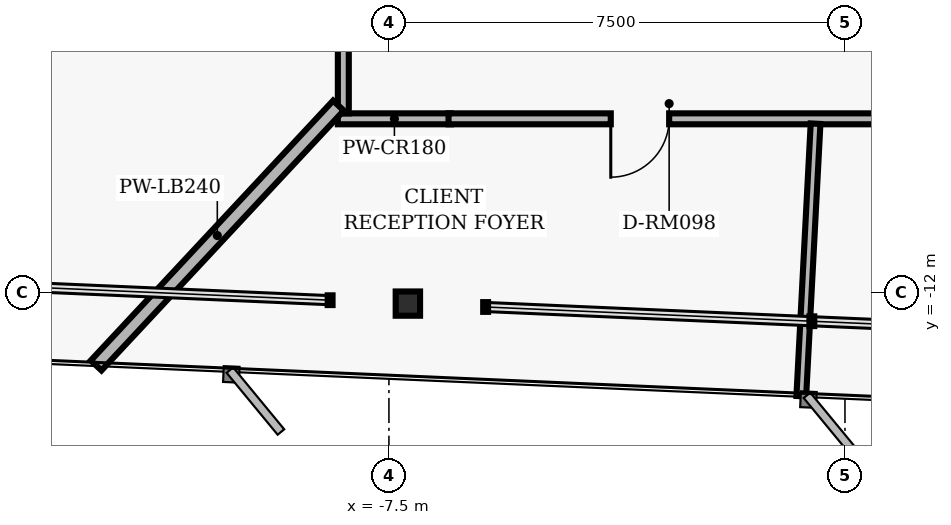
"""IFC4 building model, lengths in metres.
Left out: names, types, materials, properties, quantities, classifications, styles, units other than length and angle.
Written with IfcOpenShell. Run it as: python <this file> out.ifc"""

import sys

from ifc_helpers import new_model, si_unit, direction, frame, frame_2d, origin, origin_2d, place, context, subcontext, project, spatial, rectangle, i_section, extrude, element, fill, save


model = new_model("IFC4")
c1 = context("Model", 3, precision=1e-05, world=origin(), true_north=direction((0.0, 1.0)))
c2 = subcontext(c1, "Body", "Model", "MODEL_VIEW")
j1 = project(units=[si_unit("LENGTHUNIT", "METRE"), si_unit("PLANEANGLEUNIT", "RADIAN")], contexts=[c1])
p1 = place(None, origin())
s1 = spatial("IfcSite", under=j1, at=p1, CompositionType="ELEMENT")
p2 = place(p1, origin())
s2 = spatial("IfcBuilding", under=s1, at=p2, CompositionType="ELEMENT")
p3 = place(p2, frame((0.0, 0.0, 141.12)))
s3 = spatial("IfcBuildingStorey", under=s2, at=p3, CompositionType="ELEMENT", Elevation=141.12)
p4 = place(p3, frame((-7.188, -12.189, 0.0), z_axis=(0.0, 0.0, 1.0), x_axis=(1.0, 0.0, 0.0)))
e1 = element("IfcColumn", 1, at=p4, inside=s3, PredefinedType="COLUMN", context=c2, shape_type="SweptSolid", body=[
    extrude(i_section(OverallWidth=0.401, OverallDepth=0.399, WebThickness=0.025, FlangeThickness=0.04, FilletRadius=0.018, at=origin_2d()), origin(), (0.0, 0.0, 1.0), 3.04),
])
p5 = place(p3, frame((-6.48, -9.15, 0.0), z_axis=(0.0, 0.0, 1.0), x_axis=(-1.0, 0.0, 0.0)))
e2 = element("IfcWall", 2, at=p5, inside=s3, PredefinedType="PARTITIONING", context=c2, shape_type="SweptSolid", body=[
    extrude(rectangle(XDim=1.86, YDim=0.18, at=frame_2d((0.93, 0.0))), origin(), (0.0, 0.0, 1.0), 2.33),
])
p6 = place(p3, frame((-8.25, -9.06, 0.0), z_axis=(0.0, 0.0, 1.0), x_axis=(0.0, 1.0, 0.0)))
e3 = element("IfcWall", 3, at=p6, inside=s3, PredefinedType="PARTITIONING", context=c2, shape_type="SweptSolid", body=[
    extrude(rectangle(XDim=1.88, YDim=0.18, at=frame_2d((0.94, 0.0))), origin(), (0.0, 0.0, 1.0), 2.763),
])
p7 = place(p3, frame((10.98, -9.15, 0.0), z_axis=(0.0, 0.0, 1.0), x_axis=(-1.0, 0.0, 0.0)))
e4 = element("IfcWall", 4, at=p7, inside=s3, PredefinedType="PARTITIONING", context=c2, shape_type="SweptSolid", body=[
    extrude(rectangle(XDim=17.5, YDim=0.18, at=frame_2d((8.75, 0.0))), origin(), (0.0, 0.0, 1.0), 2.33),
])
p8 = place(p7, frame((13.872, 0.0, 0.0)))
e5 = element("IfcOpeningElement", 5, at=p8, cuts=e4, PredefinedType="OPENING", context=c2, shape_type="SweptSolid", body=[
    extrude(rectangle(XDim=0.96, YDim=2.02, at=frame_2d((0.48, 1.01))), frame((0.0, 0.1, 0.0), z_axis=(0.0, -1.0, 0.0), x_axis=(1.0, 0.0, 0.0)), (0.0, 0.0, 1.0), 0.2),
])
p9 = place(p7, frame((7.256, 0.0, 0.0)))
e6 = element("IfcOpeningElement", 6, at=p9, cuts=e4, PredefinedType="OPENING", context=c2, shape_type="SweptSolid", body=[
    extrude(rectangle(XDim=0.96, YDim=2.02, at=frame_2d((0.48, 1.01))), frame((0.0, 0.1, 0.0), z_axis=(0.0, -1.0, 0.0), x_axis=(1.0, 0.0, 0.0)), (0.0, 0.0, 1.0), 0.2),
])
p10 = place(p3, frame((-8.33, -8.933, 0.0), z_axis=(0.0, 0.0, 1.0), x_axis=(-0.682004079658, -0.731348367968, 0.0)))
e7 = element("IfcWall", 7, at=p10, inside=s3, PredefinedType="PARTITIONING", context=c2, shape_type="SweptSolid", body=[
    extrude(rectangle(XDim=5.843, YDim=0.24, at=frame_2d((2.922, 0.0))), origin(), (0.0, 0.0, 1.0), 2.763),
])
p11 = place(p3, frame((-0.484, -9.23, 0.0), z_axis=(0.0, 0.0, 1.0), x_axis=(-0.052321895389, -0.998630271553, 0.0)))
e8 = element("IfcWall", 8, at=p11, inside=s3, PredefinedType="PARTITIONING", context=c2, shape_type="SweptSolid", body=[
    extrude(rectangle(XDim=4.489, YDim=0.16, at=frame_2d((2.244, 0.0))), origin(), (0.0, 0.0, 1.0), 2.763),
])
p12 = place(p8, origin())
e9 = element("IfcDoor", 9, at=p12, inside=s3, OperationType="SINGLE_SWING_RIGHT", PredefinedType="DOOR", context=c2, shape_type="SweptSolid", body=[
    extrude(rectangle(XDim=0.96, YDim=2.02, at=frame_2d((0.48, 1.01))), frame((0.0, 0.025, 0.0), z_axis=(0.0, -1.0, 0.0), x_axis=(1.0, 0.0, 0.0)), (0.0, 0.0, 1.0), 0.05),
])
fill(e5, e9)
save(model, sys.argv[1])
